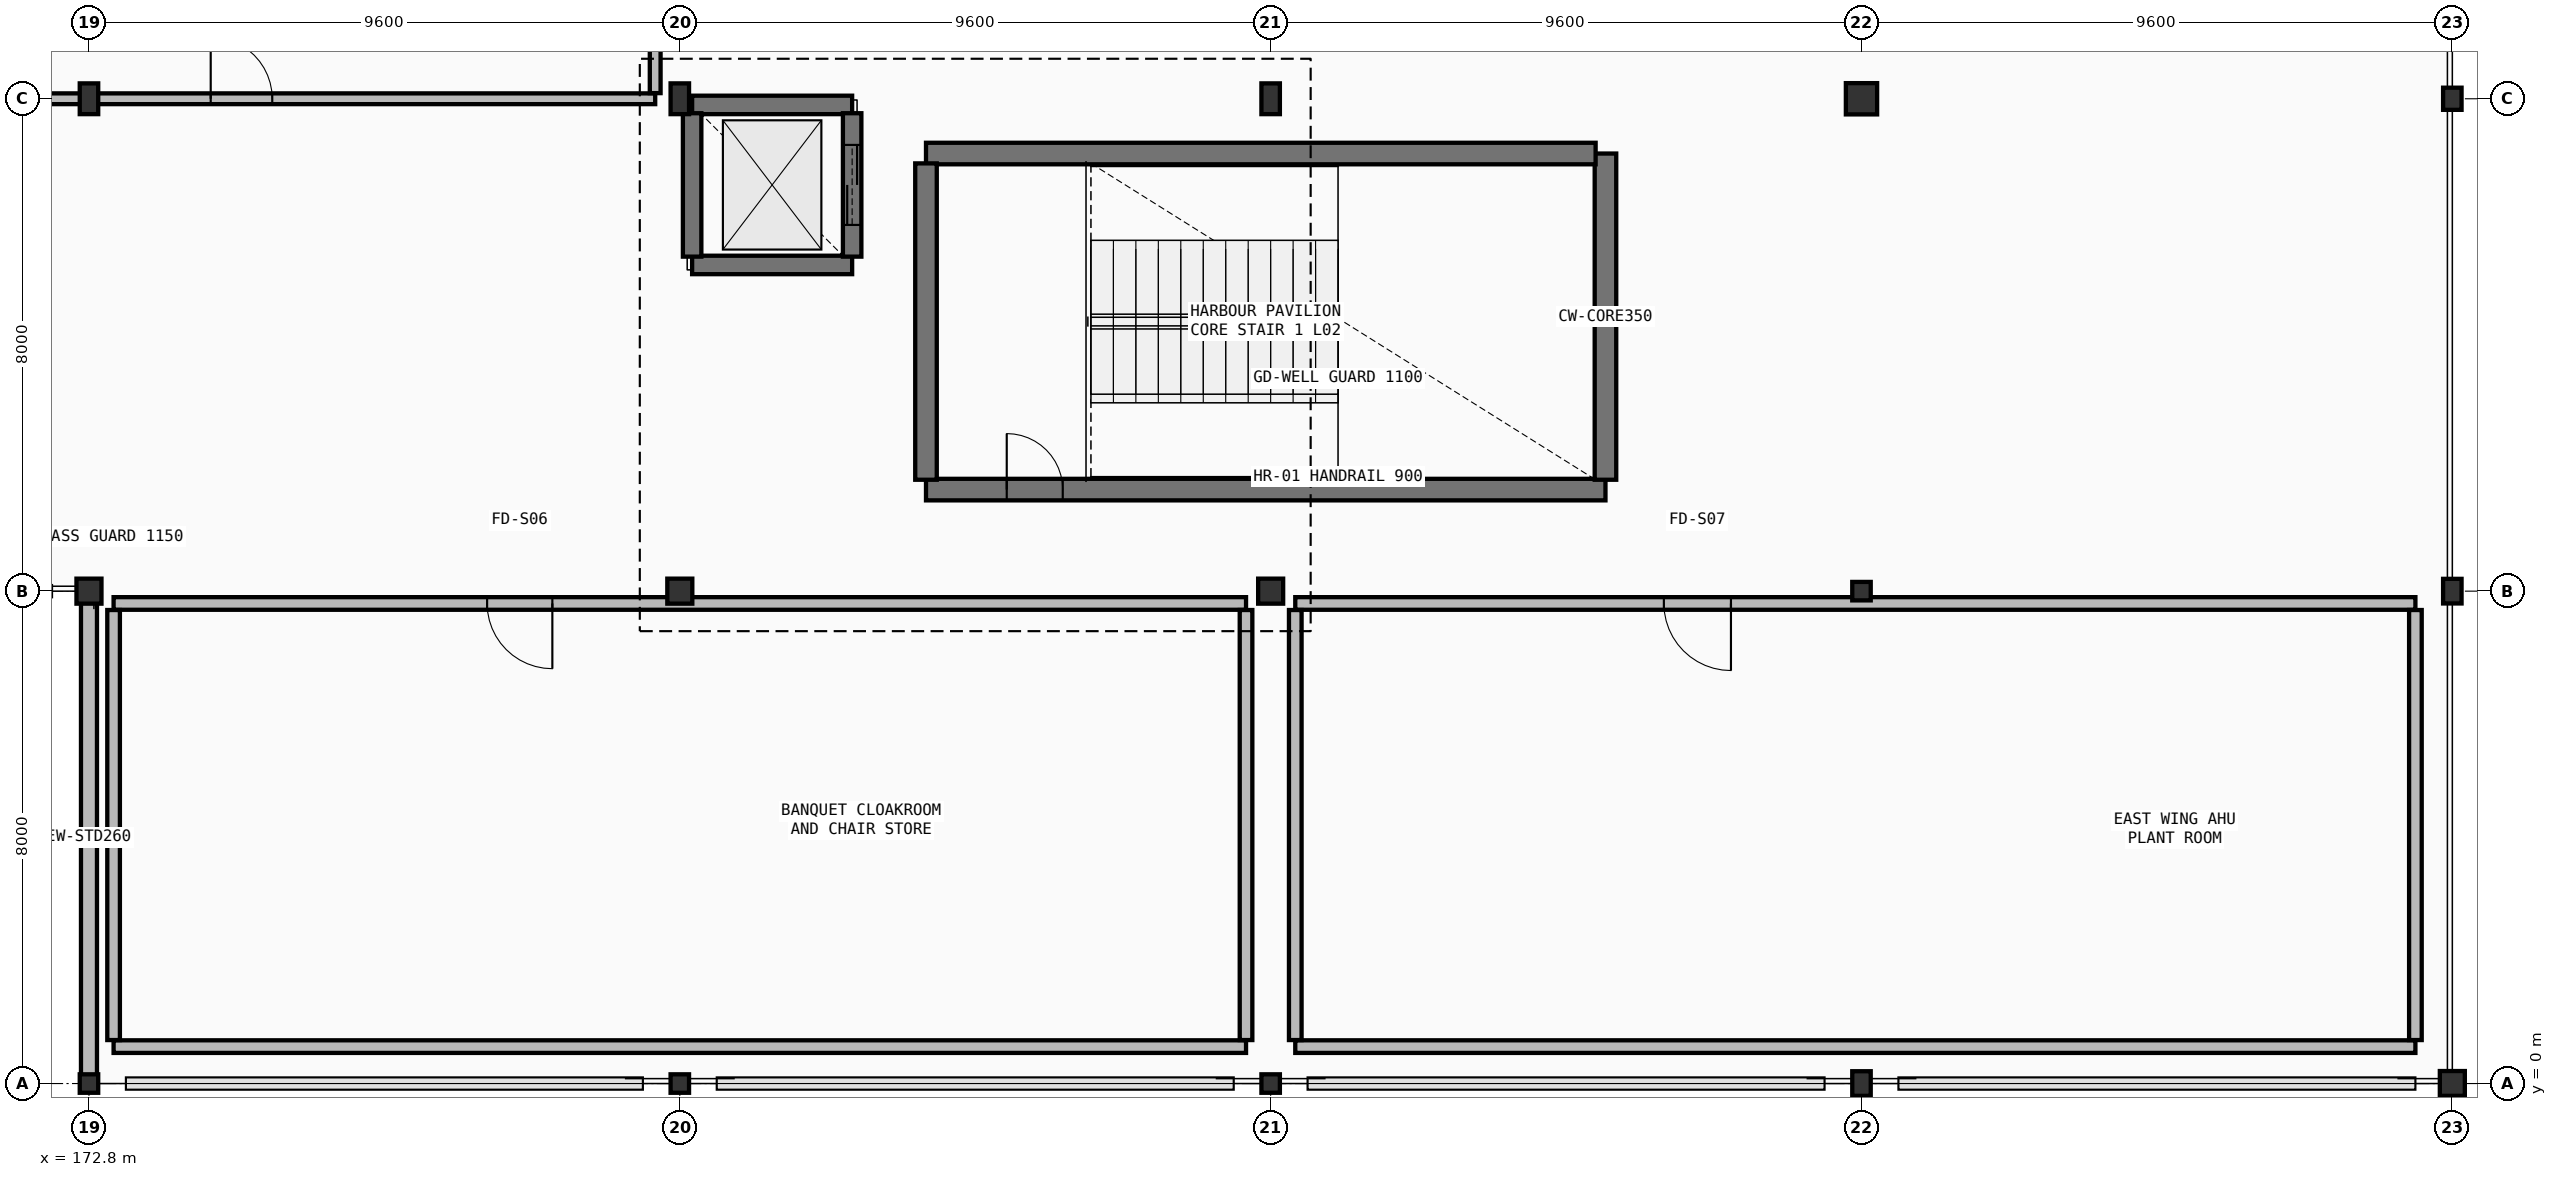
"""IFC4 building model, lengths in metres.
Left out: names, types, materials, properties, quantities, classifications, styles, units other than length and angle.
Written with IfcOpenShell. Run it as: python <this file> out.ifc"""

import sys

from ifc_helpers import new_model, si_unit, direction, frame, frame_2d, origin, origin_2d, place, context, subcontext, project, spatial, rectangle, hollow_circle, i_section, extrude, element, fill, save


model = new_model("IFC4")
c1 = context("Model", 3, precision=1e-05, world=origin(), true_north=direction((0.0, 1.0)))
c2 = subcontext(c1, "Body", "Model", "MODEL_VIEW")
j1 = project(units=[si_unit("LENGTHUNIT", "METRE"), si_unit("PLANEANGLEUNIT", "RADIAN")], contexts=[c1])
p1 = place(None, origin())
s1 = spatial("IfcSite", under=j1, at=p1, CompositionType="ELEMENT")
p2 = place(p1, origin())
s2 = spatial("IfcBuilding", under=s1, at=p2, CompositionType="ELEMENT")
p3 = place(p2, frame((0.0, 0.0, 11.4)))
s3 = spatial("IfcBuildingStorey", under=s2, at=p3, CompositionType="ELEMENT", Elevation=11.4)
p4 = place(p3, frame((172.8, 0.0, 0.0), z_axis=(0.0, 0.0, 1.0), x_axis=(1.0, 0.0, 0.0)))
e1 = element("IfcColumn", 1, at=p4, inside=s3, PredefinedType="COLUMN", context=c2, shape_type="SweptSolid", body=[
    extrude(i_section(OverallWidth=0.3, OverallDepth=0.3, WebThickness=0.011, FlangeThickness=0.019, FilletRadius=0.027, at=origin_2d()), origin(), (0.0, 0.0, 1.0), 4.5),
])
p5 = place(p3, frame((172.8, 8.0, 0.0), z_axis=(0.0, 0.0, 1.0), x_axis=(1.0, 0.0, 0.0)))
e2 = element("IfcColumn", 2, at=p5, inside=s3, PredefinedType="COLUMN", context=c2, shape_type="SweptSolid", body=[
    extrude(hollow_circle(Radius=0.203, WallThickness=0.02, at=origin_2d()), origin(), (0.0, 0.0, 1.0), 4.5),
])
p6 = place(p3, frame((172.8, 16.0, 0.0), z_axis=(0.0, 0.0, 1.0), x_axis=(1.0, 0.0, 0.0)))
e3 = element("IfcColumn", 3, at=p6, inside=s3, PredefinedType="COLUMN", context=c2, shape_type="SweptSolid", body=[
    extrude(i_section(OverallWidth=0.3, OverallDepth=0.5, WebThickness=0.014, FlangeThickness=0.028, FilletRadius=0.027, at=origin_2d()), origin(), (0.0, 0.0, 1.0), 4.5),
])
p7 = place(p3, frame((182.4, 0.0, 0.0), z_axis=(0.0, 0.0, 1.0), x_axis=(1.0, 0.0, 0.0)))
e4 = element("IfcColumn", 4, at=p7, inside=s3, PredefinedType="COLUMN", context=c2, shape_type="SweptSolid", body=[
    extrude(i_section(OverallWidth=0.3, OverallDepth=0.3, WebThickness=0.011, FlangeThickness=0.019, FilletRadius=0.027, at=origin_2d()), origin(), (0.0, 0.0, 1.0), 4.5),
])
p8 = place(p3, frame((182.4, 8.0, 0.0), z_axis=(0.0, 0.0, 1.0), x_axis=(1.0, 0.0, 0.0)))
e5 = element("IfcColumn", 5, at=p8, inside=s3, PredefinedType="COLUMN", context=c2, shape_type="SweptSolid", body=[
    extrude(hollow_circle(Radius=0.203, WallThickness=0.02, at=origin_2d()), origin(), (0.0, 0.0, 1.0), 4.5),
])
p9 = place(p3, frame((182.4, 16.0, 0.0), z_axis=(0.0, 0.0, 1.0), x_axis=(1.0, 0.0, 0.0)))
e6 = element("IfcColumn", 6, at=p9, inside=s3, PredefinedType="COLUMN", context=c2, shape_type="SweptSolid", body=[
    extrude(i_section(OverallWidth=0.3, OverallDepth=0.5, WebThickness=0.014, FlangeThickness=0.028, FilletRadius=0.027, at=origin_2d()), origin(), (0.0, 0.0, 1.0), 4.5),
])
p10 = place(p3, frame((192.0, 0.0, 0.0), z_axis=(0.0, 0.0, 1.0), x_axis=(1.0, 0.0, 0.0)))
e7 = element("IfcColumn", 7, at=p10, inside=s3, PredefinedType="COLUMN", context=c2, shape_type="SweptSolid", body=[
    extrude(i_section(OverallWidth=0.3, OverallDepth=0.3, WebThickness=0.011, FlangeThickness=0.019, FilletRadius=0.027, at=origin_2d()), origin(), (0.0, 0.0, 1.0), 4.5),
])
p11 = place(p3, frame((192.0, 8.0, 0.0), z_axis=(0.0, 0.0, 1.0), x_axis=(1.0, 0.0, 0.0)))
e8 = element("IfcColumn", 8, at=p11, inside=s3, PredefinedType="COLUMN", context=c2, shape_type="SweptSolid", body=[
    extrude(hollow_circle(Radius=0.203, WallThickness=0.02, at=origin_2d()), origin(), (0.0, 0.0, 1.0), 4.5),
])
p12 = place(p3, frame((192.0, 16.0, 0.0), z_axis=(0.0, 0.0, 1.0), x_axis=(1.0, 0.0, 0.0)))
e9 = element("IfcColumn", 9, at=p12, inside=s3, PredefinedType="COLUMN", context=c2, shape_type="SweptSolid", body=[
    extrude(i_section(OverallWidth=0.3, OverallDepth=0.5, WebThickness=0.014, FlangeThickness=0.028, FilletRadius=0.027, at=origin_2d()), origin(), (0.0, 0.0, 1.0), 4.5),
])
p13 = place(p3, frame((201.6, 0.0, 0.0), z_axis=(0.0, 0.0, 1.0), x_axis=(1.0, 0.0, 0.0)))
e10 = element("IfcColumn", 10, at=p13, inside=s3, PredefinedType="COLUMN", context=c2, shape_type="SweptSolid", body=[
    extrude(i_section(OverallWidth=0.3, OverallDepth=0.4, WebThickness=0.013, FlangeThickness=0.024, FilletRadius=0.027, at=origin_2d()), origin(), (0.0, 0.0, 1.0), 4.5),
])
p14 = place(p3, frame((201.6, 8.0, 0.0), z_axis=(0.0, 0.0, 1.0), x_axis=(1.0, 0.0, 0.0)))
e11 = element("IfcColumn", 11, at=p14, inside=s3, PredefinedType="COLUMN", context=c2, shape_type="SweptSolid", body=[
    extrude(i_section(OverallWidth=0.3, OverallDepth=0.3, WebThickness=0.011, FlangeThickness=0.019, FilletRadius=0.027, at=origin_2d()), origin(), (0.0, 0.0, 1.0), 4.5),
])
p15 = place(p3, frame((201.6, 16.0, 0.0), z_axis=(0.0, 0.0, 1.0), x_axis=(1.0, 0.0, 0.0)))
e12 = element("IfcColumn", 12, at=p15, inside=s3, PredefinedType="COLUMN", context=c2, shape_type="SweptSolid", body=[
    extrude(hollow_circle(Radius=0.254, WallThickness=0.025, at=origin_2d()), origin(), (0.0, 0.0, 1.0), 4.5),
])
p16 = place(p3, frame((211.2, 0.0, 0.0), z_axis=(0.0, 0.0, 1.0), x_axis=(1.0, 0.0, 0.0)))
e13 = element("IfcColumn", 13, at=p16, inside=s3, PredefinedType="COLUMN", context=c2, shape_type="SweptSolid", body=[
    extrude(hollow_circle(Radius=0.203, WallThickness=0.02, at=origin_2d()), origin(), (0.0, 0.0, 1.0), 4.5),
])
p17 = place(p3, frame((211.2, 8.0, 0.0), z_axis=(0.0, 0.0, 1.0), x_axis=(1.0, 0.0, 0.0)))
e14 = element("IfcColumn", 14, at=p17, inside=s3, PredefinedType="COLUMN", context=c2, shape_type="SweptSolid", body=[
    extrude(i_section(OverallWidth=0.3, OverallDepth=0.4, WebThickness=0.013, FlangeThickness=0.024, FilletRadius=0.027, at=origin_2d()), origin(), (0.0, 0.0, 1.0), 4.5),
])
p18 = place(p3, frame((211.2, 16.0, 0.0), z_axis=(0.0, 0.0, 1.0), x_axis=(1.0, 0.0, 0.0)))
e15 = element("IfcColumn", 15, at=p18, inside=s3, PredefinedType="COLUMN", context=c2, shape_type="SweptSolid", body=[
    extrude(i_section(OverallWidth=0.3, OverallDepth=0.36, WebThickness=0.012, FlangeThickness=0.022, FilletRadius=0.027, at=origin_2d()), origin(), (0.0, 0.0, 1.0), 4.5),
])
p19 = place(p3, frame((172.8, 0.0, 0.0), z_axis=(0.0, 0.0, 1.0), x_axis=(0.0, 1.0, 0.0)))
e16 = element("IfcWall", 16, at=p19, inside=s3, PredefinedType="STANDARD", context=c2, shape_type="SweptSolid", body=[
    extrude(rectangle(XDim=8.0, YDim=0.26, at=frame_2d((4.0, 0.0))), origin(), (0.0, 0.0, 1.0), 3.446),
])
p20 = place(p3, frame((186.4, 9.65, 0.0), z_axis=(0.0, 0.0, 1.0), x_axis=(1.0, 0.0, 0.0)))
e17 = element("IfcWall", 17, at=p20, inside=s3, PredefinedType="SHEAR", context=c2, shape_type="SweptSolid", body=[
    extrude(rectangle(XDim=11.04, YDim=0.35, at=frame_2d((5.52, 0.0))), origin(), (0.0, 0.0, 1.0), 4.276),
])
p21 = place(p20, frame((1.312, 0.0, 0.0)))
e18 = element("IfcOpeningElement", 18, at=p21, cuts=e17, PredefinedType="OPENING", context=c2, shape_type="SweptSolid", body=[
    extrude(rectangle(XDim=0.91, YDim=2.08, at=frame_2d((0.455, 1.04))), frame((0.0, 0.185, 0.0), z_axis=(0.0, -1.0, 0.0), x_axis=(1.0, 0.0, 0.0)), (0.0, 0.0, 1.0), 0.37),
])
p22 = place(p3, frame((197.44, 9.81, 0.0), z_axis=(0.0, 0.0, 1.0), x_axis=(0.0, 1.0, 0.0)))
e19 = element("IfcWall", 19, at=p22, inside=s3, PredefinedType="SHEAR", context=c2, shape_type="SweptSolid", body=[
    extrude(rectangle(XDim=5.3, YDim=0.35, at=frame_2d((2.65, 0.0))), origin(), (0.0, 0.0, 1.0), 4.276),
])
p23 = place(p3, frame((197.28, 15.11, 0.0), z_axis=(0.0, 0.0, 1.0), x_axis=(-1.0, 0.0, 0.0)))
e20 = element("IfcWall", 20, at=p23, inside=s3, PredefinedType="SHEAR", context=c2, shape_type="SweptSolid", body=[
    extrude(rectangle(XDim=10.88, YDim=0.35, at=frame_2d((5.44, 0.0))), origin(), (0.0, 0.0, 1.0), 4.276),
])
p24 = place(p3, frame((186.4, 14.95, 0.0), z_axis=(0.0, 0.0, 1.0), x_axis=(0.0, -1.0, 0.0)))
e21 = element("IfcWall", 21, at=p24, inside=s3, PredefinedType="SHEAR", context=c2, shape_type="SweptSolid", body=[
    extrude(rectangle(XDim=5.14, YDim=0.35, at=frame_2d((2.57, 0.0))), origin(), (0.0, 0.0, 1.0), 4.276),
])
for number, where, z_axis, x_axis in (
    (22, (185.2, 15.9, 0.0), (0.0, 0.0, 1.0), (-1.0, 0.0, 0.0)),
    (23, (182.6, 13.3, 0.0), (0.0, 0.0, 1.0), (1.0, 0.0, 0.0)),
):
    element("IfcWall", number, at=place(p3, frame(where, z_axis=z_axis, x_axis=x_axis)), inside=s3, PredefinedType="SHEAR", context=c2, shape_type="SweptSolid", body=[
        extrude(rectangle(XDim=2.6, YDim=0.3, at=frame_2d((1.3, 0.0))), origin(), (0.0, 0.0, 1.0), 4.276),
    ])
p25 = place(p3, frame((185.2, 13.435, 0.0), z_axis=(0.0, 0.0, 1.0), x_axis=(0.0, 1.0, 0.0)))
e24 = element("IfcWall", 24, at=p25, inside=s3, PredefinedType="SHEAR", context=c2, shape_type="SweptSolid", body=[
    extrude(rectangle(XDim=2.33, YDim=0.3, at=frame_2d((1.165, 0.0))), origin(), (0.0, 0.0, 1.0), 4.276),
])
p26 = place(p25, frame((0.515, 0.0, 0.0)))
e25 = element("IfcOpeningElement", 25, at=p26, cuts=e24, PredefinedType="OPENING", context=c2, shape_type="SweptSolid", body=[
    extrude(rectangle(XDim=1.3, YDim=2.22, at=frame_2d((0.65, 1.11))), frame((0.0, 0.16, 0.0), z_axis=(0.0, -1.0, 0.0), x_axis=(1.0, 0.0, 0.0)), (0.0, 0.0, 1.0), 0.32),
])
p27 = place(p3, frame((182.6, 15.765, 0.0), z_axis=(0.0, 0.0, 1.0), x_axis=(0.0, -1.0, 0.0)))
e26 = element("IfcWall", 26, at=p27, inside=s3, PredefinedType="SHEAR", context=c2, shape_type="SweptSolid", body=[
    extrude(rectangle(XDim=2.33, YDim=0.3, at=frame_2d((1.165, 0.0))), origin(), (0.0, 0.0, 1.0), 4.276),
])
p28 = place(p3, frame((144.4, 16.0, 0.0), z_axis=(0.0, 0.0, 1.0), x_axis=(1.0, 0.0, 0.0)))
e27 = element("IfcWall", 27, at=p28, inside=s3, PredefinedType="PARTITIONING", context=c2, shape_type="SweptSolid", body=[
    extrude(rectangle(XDim=37.6, YDim=0.175, at=frame_2d((18.8, 0.0))), origin(), (0.0, 0.0, 1.0), 3.346),
])
p29 = place(p28, frame((14.352, 0.0, 0.0)))
e28 = element("IfcOpeningElement", 28, at=p29, cuts=e27, PredefinedType="OPENING", context=c2, shape_type="SweptSolid", body=[
    extrude(rectangle(XDim=1.72, YDim=2.24, at=frame_2d((0.86, 1.12))), frame((0.0, 0.097, 0.0), z_axis=(0.0, -1.0, 0.0), x_axis=(1.0, 0.0, 0.0)), (0.0, 0.0, 1.0), 0.195),
])
p30 = place(p28, frame((30.378, 0.0, 0.0)))
e29 = element("IfcOpeningElement", 29, at=p30, cuts=e27, PredefinedType="OPENING", context=c2, shape_type="SweptSolid", body=[
    extrude(rectangle(XDim=1.0, YDim=2.12, at=frame_2d((0.5, 1.06))), frame((0.0, 0.097, 0.0), z_axis=(0.0, -1.0, 0.0), x_axis=(1.0, 0.0, 0.0)), (0.0, 0.0, 1.0), 0.195),
])
p31 = place(p3, frame((182.0, 16.092, 0.0), z_axis=(0.0, 0.0, 1.0), x_axis=(0.0, 1.0, 0.0)))
e30 = element("IfcWall", 30, at=p31, inside=s3, PredefinedType="PARTITIONING", context=c2, shape_type="SweptSolid", body=[
    extrude(rectangle(XDim=7.308, YDim=0.175, at=frame_2d((3.654, 0.0))), origin(), (0.0, 0.0, 1.0), 4.276),
])
p32 = place(p3, frame((191.6, 7.8, 0.0), z_axis=(0.0, 0.0, 1.0), x_axis=(-1.0, 0.0, 0.0)))
e31 = element("IfcWall", 31, at=p32, inside=s3, PredefinedType="SOLIDWALL", context=c2, shape_type="SweptSolid", body=[
    extrude(rectangle(XDim=18.4, YDim=0.205, at=frame_2d((9.2, 0.0))), origin(), (0.0, 0.0, 1.0), 3.446),
])
p33 = place(p32, frame((11.271, 0.0, 0.0)))
e32 = element("IfcOpeningElement", 32, at=p33, cuts=e31, PredefinedType="OPENING", context=c2, shape_type="SweptSolid", body=[
    extrude(rectangle(XDim=1.06, YDim=2.16, at=frame_2d((0.53, 1.08))), frame((0.0, 0.113, 0.0), z_axis=(0.0, -1.0, 0.0), x_axis=(1.0, 0.0, 0.0)), (0.0, 0.0, 1.0), 0.225),
])
p34 = place(p3, frame((173.2, 0.6, 0.0), z_axis=(0.0, 0.0, 1.0), x_axis=(1.0, 0.0, 0.0)))
e33 = element("IfcWall", 33, at=p34, inside=s3, PredefinedType="SOLIDWALL", context=c2, shape_type="SweptSolid", body=[
    extrude(rectangle(XDim=18.4, YDim=0.205, at=frame_2d((9.2, 0.0))), origin(), (0.0, 0.0, 1.0), 3.696),
])
for number, where, z_axis, x_axis in (
    (34, (191.6, 0.707, 0.0), (0.0, 0.0, 1.0), (0.0, 1.0, 0.0)),
    (35, (173.2, 7.694, 0.0), (0.0, 0.0, 1.0), (0.0, -1.0, 0.0)),
):
    element("IfcWall", number, at=place(p3, frame(where, z_axis=z_axis, x_axis=x_axis)), inside=s3, PredefinedType="SOLIDWALL", context=c2, shape_type="SweptSolid", body=[
        extrude(rectangle(XDim=6.987, YDim=0.205, at=frame_2d((3.494, 0.0))), origin(), (0.0, 0.0, 1.0), 4.276),
    ])
p35 = place(p3, frame((210.6, 7.8, 0.0), z_axis=(0.0, 0.0, 1.0), x_axis=(-1.0, 0.0, 0.0)))
e36 = element("IfcWall", 36, at=p35, inside=s3, PredefinedType="SOLIDWALL", context=c2, shape_type="SweptSolid", body=[
    extrude(rectangle(XDim=18.2, YDim=0.205, at=frame_2d((9.1, 0.0))), origin(), (0.0, 0.0, 1.0), 3.546),
])
p36 = place(p35, frame((11.121, 0.0, 0.0)))
e37 = element("IfcOpeningElement", 37, at=p36, cuts=e36, PredefinedType="OPENING", context=c2, shape_type="SweptSolid", body=[
    extrude(rectangle(XDim=1.09, YDim=2.18, at=frame_2d((0.545, 1.09))), frame((0.0, 0.113, 0.0), z_axis=(0.0, -1.0, 0.0), x_axis=(1.0, 0.0, 0.0)), (0.0, 0.0, 1.0), 0.225),
])
p37 = place(p3, frame((192.4, 0.6, 0.0), z_axis=(0.0, 0.0, 1.0), x_axis=(1.0, 0.0, 0.0)))
e38 = element("IfcWall", 38, at=p37, inside=s3, PredefinedType="SOLIDWALL", context=c2, shape_type="SweptSolid", body=[
    extrude(rectangle(XDim=18.2, YDim=0.205, at=frame_2d((9.1, 0.0))), origin(), (0.0, 0.0, 1.0), 3.546),
])
for number, where, z_axis, x_axis in (
    (39, (210.6, 0.707, 0.0), (0.0, 0.0, 1.0), (0.0, 1.0, 0.0)),
    (40, (192.4, 7.694, 0.0), (0.0, 0.0, 1.0), (0.0, -1.0, 0.0)),
):
    element("IfcWall", number, at=place(p3, frame(where, z_axis=z_axis, x_axis=x_axis)), inside=s3, PredefinedType="SOLIDWALL", context=c2, shape_type="SweptSolid", body=[
        extrude(rectangle(XDim=6.987, YDim=0.205, at=frame_2d((3.494, 0.0))), origin(), (0.0, 0.0, 1.0), 4.276),
    ])
p38 = place(p21, origin())
e41 = element("IfcDoor", 41, at=p38, inside=s3, OperationType="SINGLE_SWING_RIGHT", PredefinedType="DOOR", context=c2, shape_type="SweptSolid", body=[
    extrude(rectangle(XDim=0.91, YDim=2.08, at=frame_2d((0.455, 1.04))), frame((0.0, 0.025, 0.0), z_axis=(0.0, -1.0, 0.0), x_axis=(1.0, 0.0, 0.0)), (0.0, 0.0, 1.0), 0.05),
])
fill(e18, e41)
p39 = place(p26, origin())
e42 = element("IfcDoor", 42, at=p39, inside=s3, OperationType="DOUBLE_DOOR_SLIDING", PredefinedType="DOOR", context=c2, shape_type="SweptSolid", body=[
    extrude(rectangle(XDim=1.3, YDim=2.22, at=frame_2d((0.65, 1.11))), frame((0.0, 0.025, 0.0), z_axis=(0.0, -1.0, 0.0), x_axis=(1.0, 0.0, 0.0)), (0.0, 0.0, 1.0), 0.05),
])
fill(e25, e42)
p40 = place(p30, origin())
e43 = element("IfcDoor", 43, at=p40, inside=s3, OperationType="SINGLE_SWING_LEFT", PredefinedType="DOOR", context=c2, shape_type="SweptSolid", body=[
    extrude(rectangle(XDim=1.0, YDim=2.12, at=frame_2d((0.5, 1.06))), frame((0.0, 0.025, 0.0), z_axis=(0.0, -1.0, 0.0), x_axis=(1.0, 0.0, 0.0)), (0.0, 0.0, 1.0), 0.05),
])
fill(e29, e43)
p41 = place(p33, origin())
e44 = element("IfcDoor", 44, at=p41, inside=s3, OperationType="SINGLE_SWING_LEFT", PredefinedType="DOOR", context=c2, shape_type="SweptSolid", body=[
    extrude(rectangle(XDim=1.06, YDim=2.16, at=frame_2d((0.53, 1.08))), frame((0.0, 0.025, 0.0), z_axis=(0.0, -1.0, 0.0), x_axis=(1.0, 0.0, 0.0)), (0.0, 0.0, 1.0), 0.05),
])
fill(e32, e44)
p42 = place(p36, origin())
e45 = element("IfcDoor", 45, at=p42, inside=s3, OperationType="SINGLE_SWING_RIGHT", PredefinedType="DOOR", context=c2, shape_type="SweptSolid", body=[
    extrude(rectangle(XDim=1.09, YDim=2.18, at=frame_2d((0.545, 1.09))), frame((0.0, 0.025, 0.0), z_axis=(0.0, -1.0, 0.0), x_axis=(1.0, 0.0, 0.0)), (0.0, 0.0, 1.0), 0.05),
])
fill(e37, e45)
save(model, sys.argv[1])
